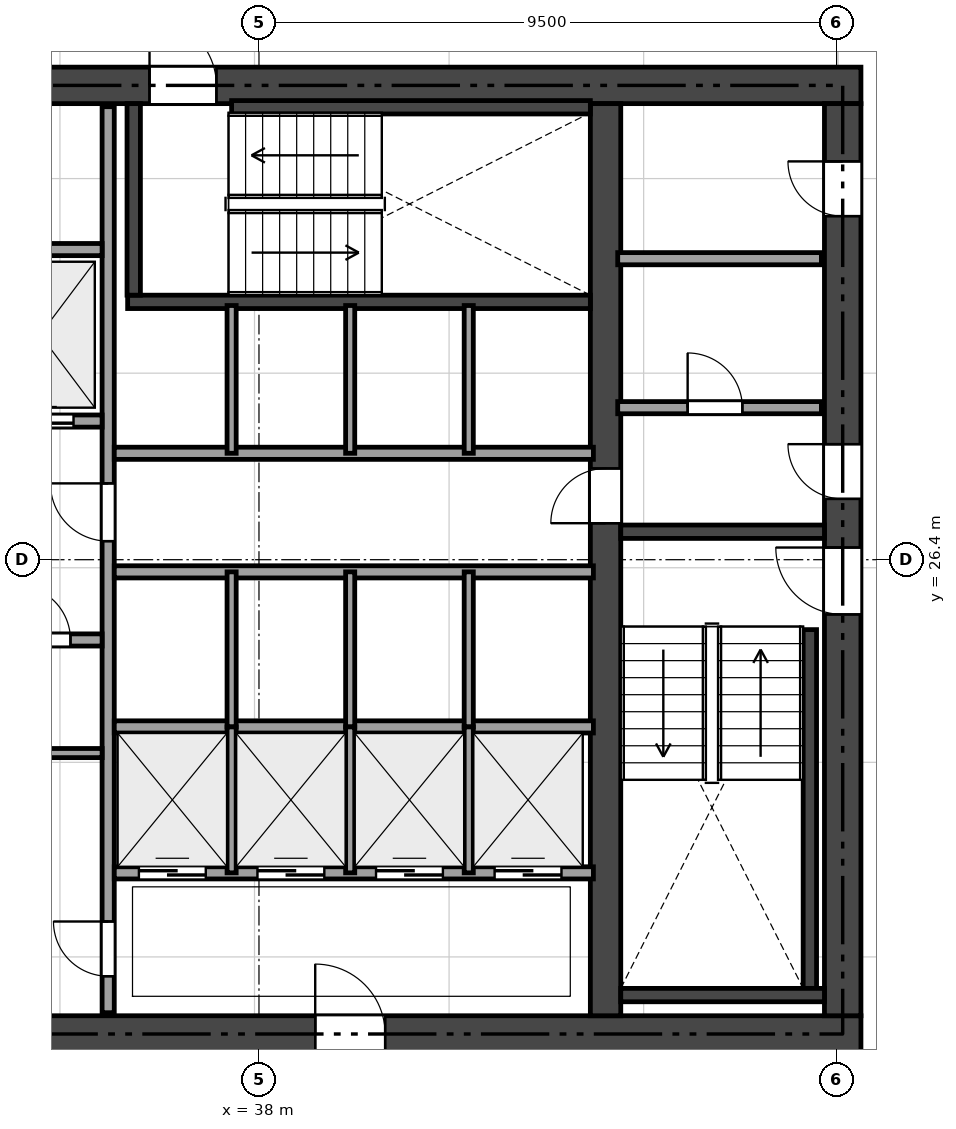
"""IFC4 building model, lengths in metres.
Left out: names, types, materials, properties, quantities, classifications, styles, units other than length and angle.
Written with IfcOpenShell. Run it as: python <this file> out.ifc"""

import sys

from ifc_helpers import new_model, si_unit, direction, frame, frame_2d, origin, place, context, subcontext, project, spatial, rectangle, extrude, element, fill, save


model = new_model("IFC4")
c1 = context("Model", 3, precision=1e-05, world=origin(), true_north=direction((0.0, 1.0)))
c2 = subcontext(c1, "Body", "Model", "MODEL_VIEW")
j1 = project(units=[si_unit("LENGTHUNIT", "METRE"), si_unit("PLANEANGLEUNIT", "RADIAN")], contexts=[c1])
p1 = place(None, origin())
s1 = spatial("IfcSite", under=j1, at=p1, CompositionType="ELEMENT")
p2 = place(p1, origin())
s2 = spatial("IfcBuilding", under=s1, at=p2, CompositionType="ELEMENT")
p3 = place(p2, frame((0.0, 0.0, 76.35)))
s3 = spatial("IfcBuildingStorey", under=s2, at=p3, CompositionType="ELEMENT", Elevation=76.35)
p4 = place(p3, frame((26.5, 18.6, 0.0), z_axis=(0.0, 0.0, 1.0), x_axis=(1.0, 0.0, 0.0)))
e1 = element("IfcWall", 1, at=p4, inside=s3, PredefinedType="SHEAR", context=c2, shape_type="SweptSolid", body=[
    extrude(rectangle(XDim=21.4, YDim=0.6, at=frame_2d((10.7, 0.0))), origin(), (0.0, 0.0, 1.0), 3.17),
])
p5 = place(p4, frame((12.425, 0.0, 0.0)))
e2 = element("IfcOpeningElement", 2, at=p5, cuts=e1, PredefinedType="OPENING", context=c2, shape_type="SweptSolid", body=[
    extrude(rectangle(XDim=1.15, YDim=2.15, at=frame_2d((0.575, 1.075))), frame((0.0, 0.31, 0.0), z_axis=(0.0, -1.0, 0.0), x_axis=(1.0, 0.0, 0.0)), (0.0, 0.0, 1.0), 0.62),
])
p6 = place(p4, frame((5.25, 0.0, 0.0)))
e3 = element("IfcOpeningElement", 3, at=p6, cuts=e1, PredefinedType="OPENING", context=c2, shape_type="SweptSolid", body=[
    extrude(rectangle(XDim=0.9, YDim=2.1, at=frame_2d((0.45, 1.05))), frame((0.0, 0.31, 0.0), z_axis=(0.0, -1.0, 0.0), x_axis=(1.0, 0.0, 0.0)), (0.0, 0.0, 1.0), 0.62),
])
p7 = place(p3, frame((26.5, 34.2, 0.0), z_axis=(0.0, 0.0, 1.0), x_axis=(1.0, 0.0, 0.0)))
e4 = element("IfcWall", 4, at=p7, inside=s3, PredefinedType="SHEAR", context=c2, shape_type="SweptSolid", body=[
    extrude(rectangle(XDim=21.4, YDim=0.6, at=frame_2d((10.7, 0.0))), origin(), (0.0, 0.0, 1.0), 3.17),
])
p8 = place(p7, frame((9.7, 0.0, 0.0)))
e5 = element("IfcOpeningElement", 5, at=p8, cuts=e4, PredefinedType="OPENING", context=c2, shape_type="SweptSolid", body=[
    extrude(rectangle(XDim=1.1, YDim=2.15, at=frame_2d((0.55, 1.075))), frame((0.0, 0.31, 0.0), z_axis=(0.0, -1.0, 0.0), x_axis=(1.0, 0.0, 0.0)), (0.0, 0.0, 1.0), 0.62),
])
p9 = place(p7, frame((1.95, 0.0, 0.0)))
e6 = element("IfcOpeningElement", 6, at=p9, cuts=e4, PredefinedType="OPENING", context=c2, shape_type="SweptSolid", body=[
    extrude(rectangle(XDim=0.9, YDim=2.1, at=frame_2d((0.45, 1.05))), frame((0.0, 0.31, 0.0), z_axis=(0.0, -1.0, 0.0), x_axis=(1.0, 0.0, 0.0)), (0.0, 0.0, 1.0), 0.62),
])
p10 = place(p7, frame((6.25, 0.0, 0.0)))
e7 = element("IfcOpeningElement", 7, at=p10, cuts=e4, PredefinedType="OPENING", context=c2, shape_type="SweptSolid", body=[
    extrude(rectangle(XDim=0.9, YDim=2.1, at=frame_2d((0.45, 1.05))), frame((0.0, 0.31, 0.0), z_axis=(0.0, -1.0, 0.0), x_axis=(1.0, 0.0, 0.0)), (0.0, 0.0, 1.0), 0.62),
])
p11 = place(p3, frame((47.6, 18.9, 0.0), z_axis=(0.0, 0.0, 1.0), x_axis=(0.0, 1.0, 0.0)))
e8 = element("IfcWall", 8, at=p11, inside=s3, PredefinedType="SHEAR", context=c2, shape_type="SweptSolid", body=[
    extrude(rectangle(XDim=15.0, YDim=0.6, at=frame_2d((7.5, 0.0))), origin(), (0.0, 0.0, 1.0), 3.17),
])
p12 = place(p11, frame((6.6, 0.0, 0.0)))
e9 = element("IfcOpeningElement", 9, at=p12, cuts=e8, PredefinedType="OPENING", context=c2, shape_type="SweptSolid", body=[
    extrude(rectangle(XDim=1.1, YDim=2.15, at=frame_2d((0.55, 1.075))), frame((0.0, 0.31, 0.0), z_axis=(0.0, -1.0, 0.0), x_axis=(1.0, 0.0, 0.0)), (0.0, 0.0, 1.0), 0.62),
])
p13 = place(p11, frame((8.5, 0.0, 0.0)))
e10 = element("IfcOpeningElement", 10, at=p13, cuts=e8, PredefinedType="OPENING", context=c2, shape_type="SweptSolid", body=[
    extrude(rectangle(XDim=0.9, YDim=2.1, at=frame_2d((0.45, 1.05))), frame((0.0, 0.31, 0.0), z_axis=(0.0, -1.0, 0.0), x_axis=(1.0, 0.0, 0.0)), (0.0, 0.0, 1.0), 0.62),
])
p14 = place(p11, frame((13.15, 0.0, 0.0)))
e11 = element("IfcOpeningElement", 11, at=p14, cuts=e8, PredefinedType="OPENING", context=c2, shape_type="SweptSolid", body=[
    extrude(rectangle(XDim=0.9, YDim=2.1, at=frame_2d((0.45, 1.05))), frame((0.0, 0.31, 0.0), z_axis=(0.0, -1.0, 0.0), x_axis=(1.0, 0.0, 0.0)), (0.0, 0.0, 1.0), 0.62),
])
p15 = place(p3, frame((43.7, 18.9, 0.0), z_axis=(0.0, 0.0, 1.0), x_axis=(0.0, 1.0, 0.0)))
e12 = element("IfcWall", 12, at=p15, inside=s3, PredefinedType="SHEAR", context=c2, shape_type="SweptSolid", body=[
    extrude(rectangle(XDim=15.0, YDim=0.5, at=frame_2d((7.5, 0.0))), origin(), (0.0, 0.0, 1.0), 3.17),
])
p16 = place(p15, frame((8.1, 0.0, 0.0)))
e13 = element("IfcOpeningElement", 13, at=p16, cuts=e12, PredefinedType="OPENING", context=c2, shape_type="SweptSolid", body=[
    extrude(rectangle(XDim=0.9, YDim=2.1, at=frame_2d((0.45, 1.05))), frame((0.0, 0.26, 0.0), z_axis=(0.0, -1.0, 0.0), x_axis=(1.0, 0.0, 0.0)), (0.0, 0.0, 1.0), 0.52),
])
p17 = place(p3, frame((43.95, 26.86, 0.0), z_axis=(0.0, 0.0, 1.0), x_axis=(1.0, 0.0, 0.0)))
e14 = element("IfcWall", 14, at=p17, inside=s3, PredefinedType="SHEAR", context=c2, shape_type="SweptSolid", body=[
    extrude(rectangle(XDim=3.35, YDim=0.22, at=frame_2d((1.675, 0.0))), origin(), (0.0, 0.0, 1.0), 3.17),
])
p18 = place(p3, frame((47.06, 19.35, 0.0), z_axis=(0.0, 0.0, 1.0), x_axis=(0.0, 1.0, 0.0)))
e15 = element("IfcWall", 15, at=p18, inside=s3, PredefinedType="SHEAR", context=c2, shape_type="SweptSolid", body=[
    extrude(rectangle(XDim=5.9, YDim=0.22, at=frame_2d((2.95, 0.0))), origin(), (0.0, 0.0, 1.0), 3.17),
])
p19 = place(p3, frame((43.95, 19.24, 0.0), z_axis=(0.0, 0.0, 1.0), x_axis=(1.0, 0.0, 0.0)))
e16 = element("IfcWall", 16, at=p19, inside=s3, PredefinedType="SHEAR", context=c2, shape_type="SweptSolid", body=[
    extrude(rectangle(XDim=3.35, YDim=0.22, at=frame_2d((1.675, 0.0))), origin(), (0.0, 0.0, 1.0), 3.17),
])
p20 = place(p3, frame((35.84, 30.64, 0.0), z_axis=(0.0, 0.0, 1.0), x_axis=(1.0, 0.0, 0.0)))
e17 = element("IfcWall", 17, at=p20, inside=s3, PredefinedType="SHEAR", context=c2, shape_type="SweptSolid", body=[
    extrude(rectangle(XDim=7.61, YDim=0.22, at=frame_2d((3.805, 0.0))), origin(), (0.0, 0.0, 1.0), 3.17),
])
p21 = place(p3, frame((35.94, 30.75, 0.0), z_axis=(0.0, 0.0, 1.0), x_axis=(0.0, 1.0, 0.0)))
e18 = element("IfcWall", 18, at=p21, inside=s3, PredefinedType="SHEAR", context=c2, shape_type="SweptSolid", body=[
    extrude(rectangle(XDim=3.15, YDim=0.22, at=frame_2d((1.575, 0.0))), origin(), (0.0, 0.0, 1.0), 3.17),
])
p22 = place(p3, frame((37.55, 33.84, 0.0), z_axis=(0.0, 0.0, 1.0), x_axis=(1.0, 0.0, 0.0)))
e19 = element("IfcWall", 19, at=p22, inside=s3, PredefinedType="SHEAR", context=c2, shape_type="SweptSolid", body=[
    extrude(rectangle(XDim=5.9, YDim=0.22, at=frame_2d((2.95, 0.0))), origin(), (0.0, 0.0, 1.0), 3.17),
])
p23 = place(p3, frame((43.9, 28.9, 0.0), z_axis=(0.0, 0.0, 1.0), x_axis=(1.0, 0.0, 0.0)))
e20 = element("IfcWall", 20, at=p23, inside=s3, PredefinedType="SOLIDWALL", context=c2, shape_type="SweptSolid", body=[
    extrude(rectangle(XDim=3.35, YDim=0.2, at=frame_2d((1.675, 0.0))), origin(), (0.0, 0.0, 1.0), 3.17),
])
p24 = place(p23, frame((1.15, 0.0, 0.0)))
e21 = element("IfcOpeningElement", 21, at=p24, cuts=e20, PredefinedType="OPENING", context=c2, shape_type="SweptSolid", body=[
    extrude(rectangle(XDim=0.9, YDim=2.1, at=frame_2d((0.45, 1.05))), frame((0.0, 0.11, 0.0), z_axis=(0.0, -1.0, 0.0), x_axis=(1.0, 0.0, 0.0)), (0.0, 0.0, 1.0), 0.22),
])
p25 = place(p3, frame((43.9, 31.35, 0.0), z_axis=(0.0, 0.0, 1.0), x_axis=(1.0, 0.0, 0.0)))
e22 = element("IfcWall", 22, at=p25, inside=s3, PredefinedType="SOLIDWALL", context=c2, shape_type="SweptSolid", body=[
    extrude(rectangle(XDim=3.35, YDim=0.2, at=frame_2d((1.675, 0.0))), origin(), (0.0, 0.0, 1.0), 3.17),
])
p26 = place(p3, frame((35.52, 18.95, 0.0), z_axis=(0.0, 0.0, 1.0), x_axis=(0.0, 1.0, 0.0)))
e23 = element("IfcWall", 23, at=p26, inside=s3, PredefinedType="SOLIDWALL", context=c2, shape_type="SweptSolid", body=[
    extrude(rectangle(XDim=14.9, YDim=0.2, at=frame_2d((7.45, 0.0))), origin(), (0.0, 0.0, 1.0), 2.691),
])
p27 = place(p26, frame((7.755, 0.0, 0.0)))
e24 = element("IfcOpeningElement", 24, at=p27, cuts=e23, PredefinedType="OPENING", context=c2, shape_type="SweptSolid", body=[
    extrude(rectangle(XDim=0.95, YDim=2.15, at=frame_2d((0.475, 1.075))), frame((0.0, 0.11, 0.0), z_axis=(0.0, -1.0, 0.0), x_axis=(1.0, 0.0, 0.0)), (0.0, 0.0, 1.0), 0.22),
])
p28 = place(p26, frame((0.6, 0.0, 0.0)))
e25 = element("IfcOpeningElement", 25, at=p28, cuts=e23, PredefinedType="OPENING", context=c2, shape_type="SweptSolid", body=[
    extrude(rectangle(XDim=0.9, YDim=2.1, at=frame_2d((0.45, 1.05))), frame((0.0, 0.11, 0.0), z_axis=(0.0, -1.0, 0.0), x_axis=(1.0, 0.0, 0.0)), (0.0, 0.0, 1.0), 0.22),
])
p29 = place(p3, frame((31.0, 28.68, 0.0), z_axis=(0.0, 0.0, 1.0), x_axis=(1.0, 0.0, 0.0)))
e26 = element("IfcWall", 26, at=p29, inside=s3, PredefinedType="SOLIDWALL", context=c2, shape_type="SweptSolid", body=[
    extrude(rectangle(XDim=4.42, YDim=0.2, at=frame_2d((2.21, 0.0))), origin(), (0.0, 0.0, 1.0), 3.17),
])
p30 = place(p29, frame((0.6, 0.0, 0.0)))
e27 = element("IfcOpeningElement", 27, at=p30, cuts=e26, PredefinedType="OPENING", context=c2, shape_type="SweptSolid", body=[
    extrude(rectangle(XDim=1.1, YDim=2.15, at=frame_2d((0.55, 1.075))), frame((0.0, 0.11, 0.0), z_axis=(0.0, -1.0, 0.0), x_axis=(1.0, 0.0, 0.0)), (0.0, 0.0, 1.0), 0.22),
])
p31 = place(p29, frame((2.85, 0.0, 0.0)))
e28 = element("IfcOpeningElement", 28, at=p31, cuts=e26, PredefinedType="OPENING", context=c2, shape_type="SweptSolid", body=[
    extrude(rectangle(XDim=1.1, YDim=2.15, at=frame_2d((0.55, 1.075))), frame((0.0, 0.11, 0.0), z_axis=(0.0, -1.0, 0.0), x_axis=(1.0, 0.0, 0.0)), (0.0, 0.0, 1.0), 0.22),
])
p32 = place(p3, frame((31.0, 31.5, 0.0), z_axis=(0.0, 0.0, 1.0), x_axis=(1.0, 0.0, 0.0)))
e29 = element("IfcWall", 29, at=p32, inside=s3, PredefinedType="SOLIDWALL", context=c2, shape_type="SweptSolid", body=[
    extrude(rectangle(XDim=4.42, YDim=0.2, at=frame_2d((2.21, 0.0))), origin(), (0.0, 0.0, 1.0), 3.17),
])
p33 = place(p3, frame((31.0, 25.08, 0.0), z_axis=(0.0, 0.0, 1.0), x_axis=(1.0, 0.0, 0.0)))
e30 = element("IfcWall", 30, at=p33, inside=s3, PredefinedType="SOLIDWALL", context=c2, shape_type="SweptSolid", body=[
    extrude(rectangle(XDim=4.42, YDim=0.2, at=frame_2d((2.21, 0.0))), origin(), (0.0, 0.0, 1.0), 3.17),
])
p34 = place(p33, frame((3.0, 0.0, 0.0)))
e31 = element("IfcOpeningElement", 31, at=p34, cuts=e30, PredefinedType="OPENING", context=c2, shape_type="SweptSolid", body=[
    extrude(rectangle(XDim=0.9, YDim=2.1, at=frame_2d((0.45, 1.05))), frame((0.0, 0.11, 0.0), z_axis=(0.0, -1.0, 0.0), x_axis=(1.0, 0.0, 0.0)), (0.0, 0.0, 1.0), 0.22),
])
p35 = place(p33, frame((0.62, 0.0, 0.0)))
e32 = element("IfcOpeningElement", 32, at=p35, cuts=e30, PredefinedType="OPENING", context=c2, shape_type="SweptSolid", body=[
    extrude(rectangle(XDim=1.2, YDim=2.15, at=frame_2d((0.6, 1.075))), frame((0.0, 0.11, 0.0), z_axis=(0.0, -1.0, 0.0), x_axis=(1.0, 0.0, 0.0)), (0.0, 0.0, 1.0), 0.22),
])
p36 = place(p3, frame((33.42, 23.22, 0.0), z_axis=(0.0, 0.0, 1.0), x_axis=(1.0, 0.0, 0.0)))
e33 = element("IfcWall", 33, at=p36, inside=s3, PredefinedType="PARTITIONING", context=c2, shape_type="SweptSolid", body=[
    extrude(rectangle(XDim=2.0, YDim=0.15, at=frame_2d((1.0, 0.0))), origin(), (0.0, 0.0, 1.0), 3.17),
])
for number, where, z_axis, x_axis in (
    (34, (35.62, 28.15, 0.0), (0.0, 0.0, 1.0), (1.0, 0.0, 0.0)),
    (35, (35.62, 26.2, 0.0), (0.0, 0.0, 1.0), (1.0, 0.0, 0.0)),
):
    element("IfcWall", number, at=place(p3, frame(where, z_axis=z_axis, x_axis=x_axis)), inside=s3, PredefinedType="SOLIDWALL", context=c2, shape_type="SweptSolid", body=[
        extrude(rectangle(XDim=7.88, YDim=0.2, at=frame_2d((3.94, 0.0))), origin(), (0.0, 0.0, 1.0), 3.17),
    ])
p37 = place(p3, frame((35.62, 23.65, 0.0), z_axis=(0.0, 0.0, 1.0), x_axis=(1.0, 0.0, 0.0)))
e36 = element("IfcWall", 36, at=p37, inside=s3, PredefinedType="SOLIDWALL", context=c2, shape_type="SweptSolid", body=[
    extrude(rectangle(XDim=7.88, YDim=0.2, at=frame_2d((3.94, 0.0))), origin(), (0.0, 0.0, 1.0), 2.691),
])
p38 = place(p3, frame((35.62, 21.25, 0.0), z_axis=(0.0, 0.0, 1.0), x_axis=(1.0, 0.0, 0.0)))
e37 = element("IfcWall", 37, at=p38, inside=s3, PredefinedType="SOLIDWALL", context=c2, shape_type="SweptSolid", body=[
    extrude(rectangle(XDim=7.88, YDim=0.2, at=frame_2d((3.94, 0.0))), origin(), (0.0, 0.0, 1.0), 3.17),
])
p39 = place(p38, frame((0.405, 0.0, 0.0)))
e38 = element("IfcOpeningElement", 38, at=p39, cuts=e37, PredefinedType="OPENING", context=c2, shape_type="SweptSolid", body=[
    extrude(rectangle(XDim=1.1, YDim=2.15, at=frame_2d((0.55, 1.075))), frame((0.0, 0.11, 0.0), z_axis=(0.0, -1.0, 0.0), x_axis=(1.0, 0.0, 0.0)), (0.0, 0.0, 1.0), 0.22),
])
p40 = place(p38, frame((2.355, 0.0, 0.0)))
e39 = element("IfcOpeningElement", 39, at=p40, cuts=e37, PredefinedType="OPENING", context=c2, shape_type="SweptSolid", body=[
    extrude(rectangle(XDim=1.1, YDim=2.15, at=frame_2d((0.55, 1.075))), frame((0.0, 0.11, 0.0), z_axis=(0.0, -1.0, 0.0), x_axis=(1.0, 0.0, 0.0)), (0.0, 0.0, 1.0), 0.22),
])
p41 = place(p38, frame((4.305, 0.0, 0.0)))
e40 = element("IfcOpeningElement", 40, at=p41, cuts=e37, PredefinedType="OPENING", context=c2, shape_type="SweptSolid", body=[
    extrude(rectangle(XDim=1.1, YDim=2.15, at=frame_2d((0.55, 1.075))), frame((0.0, 0.11, 0.0), z_axis=(0.0, -1.0, 0.0), x_axis=(1.0, 0.0, 0.0)), (0.0, 0.0, 1.0), 0.22),
])
p42 = place(p38, frame((6.255, 0.0, 0.0)))
e41 = element("IfcOpeningElement", 41, at=p42, cuts=e37, PredefinedType="OPENING", context=c2, shape_type="SweptSolid", body=[
    extrude(rectangle(XDim=1.1, YDim=2.15, at=frame_2d((0.55, 1.075))), frame((0.0, 0.11, 0.0), z_axis=(0.0, -1.0, 0.0), x_axis=(1.0, 0.0, 0.0)), (0.0, 0.0, 1.0), 0.22),
])
for number, where, z_axis, x_axis in (
    (42, (37.55, 28.15, 0.0), (0.0, 0.0, 1.0), (0.0, 1.0, 0.0)),
    (43, (39.5, 28.15, 0.0), (0.0, 0.0, 1.0), (0.0, 1.0, 0.0)),
    (44, (41.45, 28.15, 0.0), (0.0, 0.0, 1.0), (0.0, 1.0, 0.0)),
):
    element("IfcWall", number, at=place(p3, frame(where, z_axis=z_axis, x_axis=x_axis)), inside=s3, PredefinedType="PARTITIONING", context=c2, shape_type="SweptSolid", body=[
        extrude(rectangle(XDim=2.43, YDim=0.15, at=frame_2d((1.215, 0.0))), origin(), (0.0, 0.0, 1.0), 3.17),
    ])
for number, where, z_axis, x_axis in (
    (45, (37.55, 23.65, 0.0), (0.0, 0.0, 1.0), (0.0, 1.0, 0.0)),
    (46, (39.5, 23.65, 0.0), (0.0, 0.0, 1.0), (0.0, 1.0, 0.0)),
    (47, (41.45, 23.65, 0.0), (0.0, 0.0, 1.0), (0.0, 1.0, 0.0)),
):
    element("IfcWall", number, at=place(p3, frame(where, z_axis=z_axis, x_axis=x_axis)), inside=s3, PredefinedType="PARTITIONING", context=c2, shape_type="SweptSolid", body=[
        extrude(rectangle(XDim=2.55, YDim=0.15, at=frame_2d((1.275, 0.0))), origin(), (0.0, 0.0, 1.0), 2.691),
    ])
for number, where, z_axis, x_axis in (
    (48, (37.55, 21.25, 0.0), (0.0, 0.0, 1.0), (0.0, 1.0, 0.0)),
    (49, (39.5, 21.25, 0.0), (0.0, 0.0, 1.0), (0.0, 1.0, 0.0)),
    (50, (41.45, 21.25, 0.0), (0.0, 0.0, 1.0), (0.0, 1.0, 0.0)),
):
    element("IfcWall", number, at=place(p3, frame(where, z_axis=z_axis, x_axis=x_axis)), inside=s3, PredefinedType="PARTITIONING", context=c2, shape_type="SweptSolid", body=[
        extrude(rectangle(XDim=2.4, YDim=0.15, at=frame_2d((1.2, 0.0))), origin(), (0.0, 0.0, 1.0), 2.691),
    ])
p43 = place(p12, origin())
e51 = element("IfcDoor", 51, at=p43, inside=s3, OperationType="SINGLE_SWING_RIGHT", PredefinedType="DOOR", context=c2, shape_type="SweptSolid", body=[
    extrude(rectangle(XDim=1.1, YDim=2.15, at=frame_2d((0.55, 1.075))), frame((0.0, 0.025, 0.0), z_axis=(0.0, -1.0, 0.0), x_axis=(1.0, 0.0, 0.0)), (0.0, 0.0, 1.0), 0.05),
])
fill(e9, e51)
p44 = place(p8, origin())
e52 = element("IfcDoor", 52, at=p44, inside=s3, OperationType="SINGLE_SWING_LEFT", PredefinedType="DOOR", context=c2, shape_type="SweptSolid", body=[
    extrude(rectangle(XDim=1.1, YDim=2.15, at=frame_2d((0.55, 1.075))), frame((0.0, 0.025, 0.0), z_axis=(0.0, -1.0, 0.0), x_axis=(1.0, 0.0, 0.0)), (0.0, 0.0, 1.0), 0.05),
])
fill(e5, e52)
p45 = place(p27, origin())
e53 = element("IfcDoor", 53, at=p45, inside=s3, OperationType="SINGLE_SWING_RIGHT", PredefinedType="DOOR", context=c2, shape_type="SweptSolid", body=[
    extrude(rectangle(XDim=0.95, YDim=2.15, at=frame_2d((0.475, 1.075))), frame((0.0, 0.025, 0.0), z_axis=(0.0, -1.0, 0.0), x_axis=(1.0, 0.0, 0.0)), (0.0, 0.0, 1.0), 0.05),
])
fill(e24, e53)
p46 = place(p16, origin())
e54 = element("IfcDoor", 54, at=p46, inside=s3, OperationType="SINGLE_SWING_LEFT", PredefinedType="DOOR", context=c2, shape_type="SweptSolid", body=[
    extrude(rectangle(XDim=0.9, YDim=2.1, at=frame_2d((0.45, 1.05))), frame((0.0, 0.025, 0.0), z_axis=(0.0, -1.0, 0.0), x_axis=(1.0, 0.0, 0.0)), (0.0, 0.0, 1.0), 0.05),
])
fill(e13, e54)
p47 = place(p13, origin())
e55 = element("IfcDoor", 55, at=p47, inside=s3, OperationType="SINGLE_SWING_RIGHT", PredefinedType="DOOR", context=c2, shape_type="SweptSolid", body=[
    extrude(rectangle(XDim=0.9, YDim=2.1, at=frame_2d((0.45, 1.05))), frame((0.0, 0.025, 0.0), z_axis=(0.0, -1.0, 0.0), x_axis=(1.0, 0.0, 0.0)), (0.0, 0.0, 1.0), 0.05),
])
fill(e10, e55)
p48 = place(p5, origin())
e56 = element("IfcDoor", 56, at=p48, inside=s3, OperationType="SINGLE_SWING_LEFT", PredefinedType="DOOR", context=c2, shape_type="SweptSolid", body=[
    extrude(rectangle(XDim=1.15, YDim=2.15, at=frame_2d((0.575, 1.075))), frame((0.0, 0.025, 0.0), z_axis=(0.0, -1.0, 0.0), x_axis=(1.0, 0.0, 0.0)), (0.0, 0.0, 1.0), 0.05),
])
fill(e2, e56)
p49 = place(p24, origin())
e57 = element("IfcDoor", 57, at=p49, inside=s3, OperationType="SINGLE_SWING_LEFT", PredefinedType="DOOR", context=c2, shape_type="SweptSolid", body=[
    extrude(rectangle(XDim=0.9, YDim=2.1, at=frame_2d((0.45, 1.05))), frame((0.0, 0.025, 0.0), z_axis=(0.0, -1.0, 0.0), x_axis=(1.0, 0.0, 0.0)), (0.0, 0.0, 1.0), 0.05),
])
fill(e21, e57)
p50 = place(p14, origin())
e58 = element("IfcDoor", 58, at=p50, inside=s3, OperationType="SINGLE_SWING_RIGHT", PredefinedType="DOOR", context=c2, shape_type="SweptSolid", body=[
    extrude(rectangle(XDim=0.9, YDim=2.1, at=frame_2d((0.45, 1.05))), frame((0.0, 0.025, 0.0), z_axis=(0.0, -1.0, 0.0), x_axis=(1.0, 0.0, 0.0)), (0.0, 0.0, 1.0), 0.05),
])
fill(e11, e58)
p51 = place(p28, origin())
e59 = element("IfcDoor", 59, at=p51, inside=s3, OperationType="SINGLE_SWING_RIGHT", PredefinedType="DOOR", context=c2, shape_type="SweptSolid", body=[
    extrude(rectangle(XDim=0.9, YDim=2.1, at=frame_2d((0.45, 1.05))), frame((0.0, 0.025, 0.0), z_axis=(0.0, -1.0, 0.0), x_axis=(1.0, 0.0, 0.0)), (0.0, 0.0, 1.0), 0.05),
])
fill(e25, e59)
p52 = place(p34, origin())
e60 = element("IfcDoor", 60, at=p52, inside=s3, OperationType="SINGLE_SWING_LEFT", PredefinedType="DOOR", context=c2, shape_type="SweptSolid", body=[
    extrude(rectangle(XDim=0.9, YDim=2.1, at=frame_2d((0.45, 1.05))), frame((0.0, 0.025, 0.0), z_axis=(0.0, -1.0, 0.0), x_axis=(1.0, 0.0, 0.0)), (0.0, 0.0, 1.0), 0.05),
])
fill(e31, e60)
p53 = place(p31, origin())
e61 = element("IfcDoor", 61, at=p53, inside=s3, OperationType="SLIDING_TO_LEFT", PredefinedType="DOOR", context=c2, shape_type="SweptSolid", body=[
    extrude(rectangle(XDim=1.1, YDim=2.15, at=frame_2d((0.55, 1.075))), frame((0.0, 0.025, 0.0), z_axis=(0.0, -1.0, 0.0), x_axis=(1.0, 0.0, 0.0)), (0.0, 0.0, 1.0), 0.05),
])
fill(e28, e61)
p54 = place(p39, origin())
e62 = element("IfcDoor", 62, at=p54, inside=s3, OperationType="SLIDING_TO_LEFT", PredefinedType="DOOR", context=c2, shape_type="SweptSolid", body=[
    extrude(rectangle(XDim=1.1, YDim=2.15, at=frame_2d((0.55, 1.075))), frame((0.0, 0.025, 0.0), z_axis=(0.0, -1.0, 0.0), x_axis=(1.0, 0.0, 0.0)), (0.0, 0.0, 1.0), 0.05),
])
fill(e38, e62)
p55 = place(p40, origin())
e63 = element("IfcDoor", 63, at=p55, inside=s3, OperationType="SLIDING_TO_LEFT", PredefinedType="DOOR", context=c2, shape_type="SweptSolid", body=[
    extrude(rectangle(XDim=1.1, YDim=2.15, at=frame_2d((0.55, 1.075))), frame((0.0, 0.025, 0.0), z_axis=(0.0, -1.0, 0.0), x_axis=(1.0, 0.0, 0.0)), (0.0, 0.0, 1.0), 0.05),
])
fill(e39, e63)
p56 = place(p41, origin())
e64 = element("IfcDoor", 64, at=p56, inside=s3, OperationType="SLIDING_TO_LEFT", PredefinedType="DOOR", context=c2, shape_type="SweptSolid", body=[
    extrude(rectangle(XDim=1.1, YDim=2.15, at=frame_2d((0.55, 1.075))), frame((0.0, 0.025, 0.0), z_axis=(0.0, -1.0, 0.0), x_axis=(1.0, 0.0, 0.0)), (0.0, 0.0, 1.0), 0.05),
])
fill(e40, e64)
p57 = place(p42, origin())
e65 = element("IfcDoor", 65, at=p57, inside=s3, OperationType="SLIDING_TO_LEFT", PredefinedType="DOOR", context=c2, shape_type="SweptSolid", body=[
    extrude(rectangle(XDim=1.1, YDim=2.15, at=frame_2d((0.55, 1.075))), frame((0.0, 0.025, 0.0), z_axis=(0.0, -1.0, 0.0), x_axis=(1.0, 0.0, 0.0)), (0.0, 0.0, 1.0), 0.05),
])
fill(e41, e65)
save(model, sys.argv[1])
